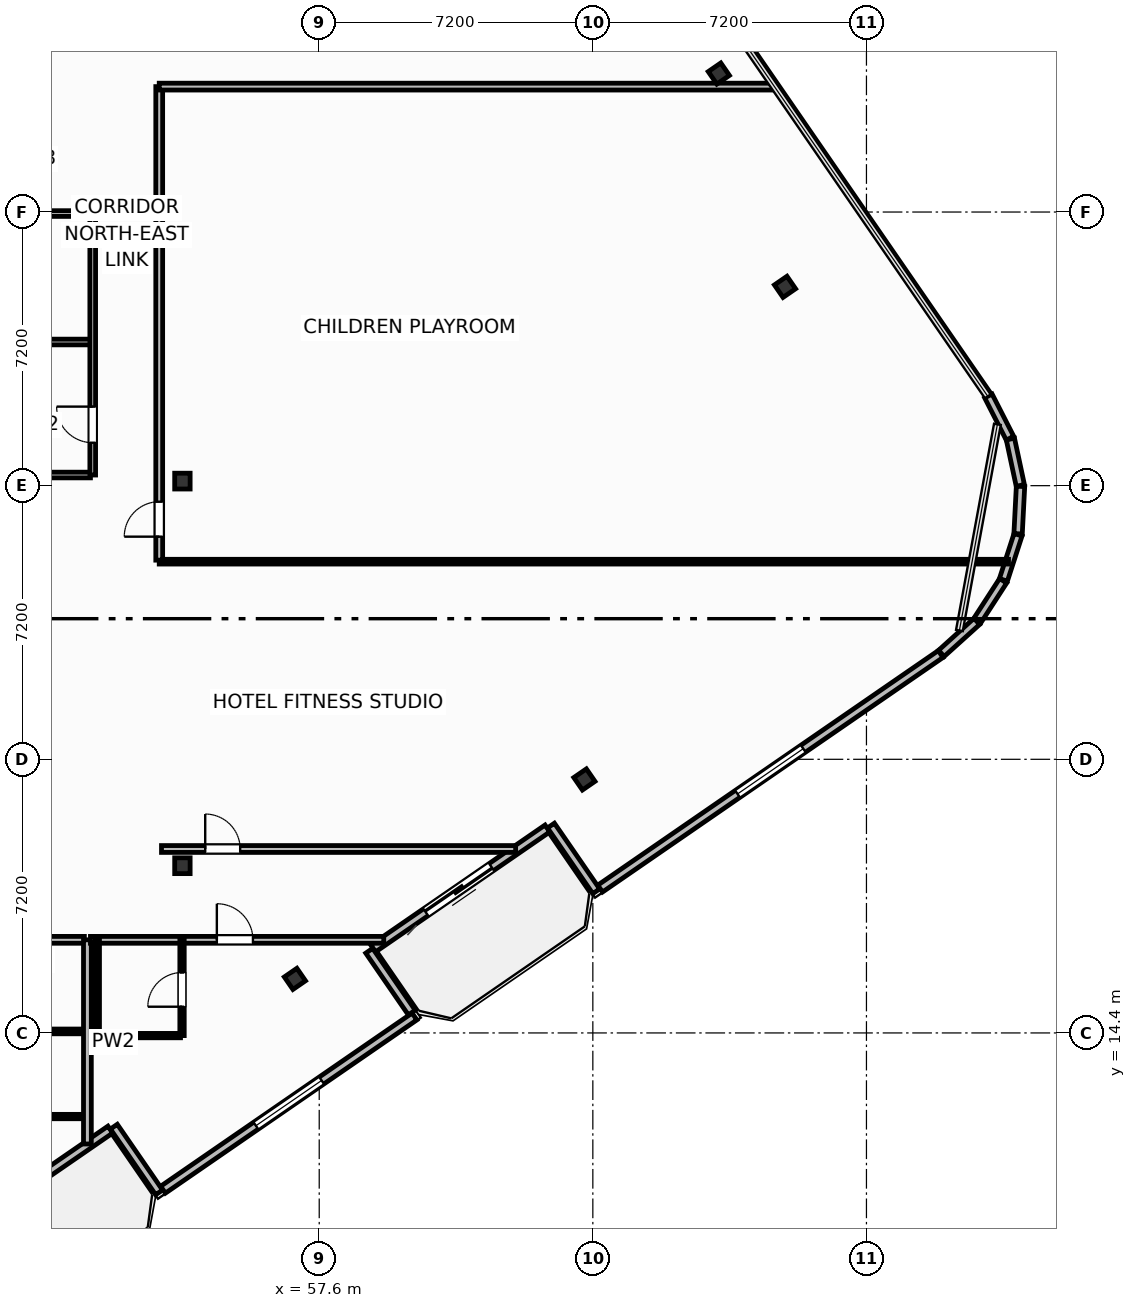
"""IFC4 building model, lengths in metres.
Left out: names, types, materials, properties, quantities, classifications, styles, units other than length and angle.
Written with IfcOpenShell. Run it as: python <this file> out.ifc"""

import sys

from ifc_helpers import new_model, si_unit, direction, frame, frame_2d, origin, origin_2d, place, context, subcontext, project, spatial, rectangle, i_section, extrude, element, fill, save


model = new_model("IFC4")
c1 = context("Model", 3, precision=1e-05, world=origin(), true_north=direction((0.0, 1.0)))
c2 = subcontext(c1, "Body", "Model", "MODEL_VIEW")
j1 = project(units=[si_unit("LENGTHUNIT", "METRE"), si_unit("PLANEANGLEUNIT", "RADIAN")], contexts=[c1])
p1 = place(None, origin())
s1 = spatial("IfcSite", under=j1, at=p1, CompositionType="ELEMENT")
p2 = place(p1, origin())
s2 = spatial("IfcBuilding", under=s1, at=p2, CompositionType="ELEMENT")
p3 = place(p2, frame((0.0, 0.0, 273.0)))
s3 = spatial("IfcBuildingStorey", under=s2, at=p3, CompositionType="ELEMENT", Elevation=273.0)
for number, where, z_axis, x_axis in (
    (1, (54.0, 18.8, 0.0), (0.0, 0.0, 1.0), (1.0, 0.0, 0.0)),
    (2, (54.0, 28.92, 0.0), (0.0, 0.0, 1.0), (1.0, 0.0, 0.0)),
):
    element("IfcColumn", number, at=place(p3, frame(where, z_axis=z_axis, x_axis=x_axis)), inside=s3, PredefinedType="COLUMN", context=c2, shape_type="SweptSolid", body=[
        extrude(i_section(OverallWidth=0.406, OverallDepth=0.416, WebThickness=0.03, FlangeThickness=0.048, FilletRadius=0.025, at=origin_2d()), origin(), (0.0, 0.0, 1.0), 3.7),
    ])
for number, where, z_axis, x_axis in (
    (3, (56.96, 15.823, 0.0), (0.0, 0.0, 1.0), (0.824, 0.567, 0.0)),
    (4, (64.578, 21.07, 0.0), (0.0, 0.0, 1.0), (0.824, 0.567, 0.0)),
    (5, (69.857, 34.031, 0.0), (0.0, 0.0, 1.0), (0.824, 0.567, 0.0)),
    (6, (68.115, 39.644, 0.0), (0.0, 0.0, 1.0), (0.824, 0.567, 0.0)),
):
    element("IfcColumn", number, at=place(p3, frame(where, z_axis=z_axis, x_axis=x_axis)), inside=s3, PredefinedType="COLUMN", context=c2, shape_type="SweptSolid", body=[
        extrude(i_section(OverallWidth=0.401, OverallDepth=0.399, WebThickness=0.025, FlangeThickness=0.04, FilletRadius=0.022, at=origin_2d()), origin(), (0.0, 0.0, 1.0), 3.7),
    ])
p4 = place(p3, frame((52.103, 11.857, 0.0), z_axis=(0.0, 0.0, 1.0), x_axis=(-0.823534636215, -0.567265989598, 0.0)))
e7 = element("IfcWall", 7, at=p4, inside=s3, PredefinedType="SOLIDWALL", context=c2, shape_type="SweptSolid", body=[
    extrude(rectangle(XDim=6.0, YDim=0.22, at=frame_2d((3.0, 0.0))), origin(), (0.0, 0.0, 1.0), 2.73),
])
p5 = place(p4, frame((3.5, 0.0, 0.0)))
e8 = element("IfcOpeningElement", 8, at=p5, cuts=e7, PredefinedType="OPENING", context=c2, shape_type="SweptSolid", body=[
    extrude(rectangle(XDim=2.1, YDim=2.3, at=frame_2d((1.05, 1.15))), frame((0.0, 0.12, 0.0), z_axis=(0.0, -1.0, 0.0), x_axis=(1.0, 0.0, 0.0)), (0.0, 0.0, 1.0), 0.24),
])
p6 = place(p3, frame((63.605, 19.78, 0.0), z_axis=(0.0, 0.0, 1.0), x_axis=(-0.823541290762, -0.567256328665, 0.0)))
e9 = element("IfcWall", 9, at=p6, inside=s3, PredefinedType="SOLIDWALL", context=c2, shape_type="SweptSolid", body=[
    extrude(rectangle(XDim=5.567, YDim=0.22, at=frame_2d((2.784, 0.0))), origin(), (0.0, 0.0, 1.0), 2.73),
])
p7 = place(p6, frame((1.787, 0.0, 0.0)))
e10 = element("IfcOpeningElement", 10, at=p7, cuts=e9, PredefinedType="OPENING", context=c2, shape_type="SweptSolid", body=[
    extrude(rectangle(XDim=2.1, YDim=2.3, at=frame_2d((1.05, 1.15))), frame((0.0, 0.12, 0.0), z_axis=(0.0, -1.0, 0.0), x_axis=(1.0, 0.0, 0.0)), (0.0, 0.0, 1.0), 0.24),
])
p8 = place(p3, frame((52.196, 11.933, 0.0), z_axis=(0.0, 0.0, 1.0), x_axis=(0.56729822855, -0.823512428494, 0.0)))
e11 = element("IfcWall", 11, at=p8, inside=s3, PredefinedType="SOLIDWALL", context=c2, shape_type="SweptSolid", body=[
    extrude(rectangle(XDim=2.1, YDim=0.22, at=frame_2d((1.05, 0.0))), origin(), (0.0, 0.0, 1.0), 2.73),
])
p9 = place(p3, frame((53.49, 10.275, 0.0), z_axis=(0.0, 0.0, 1.0), x_axis=(0.823530942962, 0.56727135128, 0.0)))
e12 = element("IfcWall", 12, at=p9, inside=s3, PredefinedType="SOLIDWALL", context=c2, shape_type="SweptSolid", body=[
    extrude(rectangle(XDim=8.035, YDim=0.22, at=frame_2d((4.018, 0.0))), origin(), (0.0, 0.0, 1.0), 2.73),
])
p10 = place(p9, frame((2.968, 0.0, 0.8)))
e13 = element("IfcOpeningElement", 13, at=p10, cuts=e12, PredefinedType="OPENING", context=c2, shape_type="SweptSolid", body=[
    extrude(rectangle(XDim=2.1, YDim=1.75, at=frame_2d((1.05, 0.875))), frame((0.0, 0.12, 0.0), z_axis=(0.0, -1.0, 0.0), x_axis=(1.0, 0.0, 0.0)), (0.0, 0.0, 1.0), 0.24),
])
p11 = place(p3, frame((60.036, 14.936, 0.0), z_axis=(0.0, 0.0, 1.0), x_axis=(-0.567273565974, 0.823529417415, 0.0)))
e14 = element("IfcWall", 14, at=p11, inside=s3, PredefinedType="SOLIDWALL", context=c2, shape_type="SweptSolid", body=[
    extrude(rectangle(XDim=1.975, YDim=0.22, at=frame_2d((0.988, 0.0))), origin(), (0.0, 0.0, 1.0), 2.73),
])
p12 = place(p3, frame((63.698, 19.856, 0.0), z_axis=(0.0, 0.0, 1.0), x_axis=(0.567219383419, -0.823566737474, 0.0)))
e15 = element("IfcWall", 15, at=p12, inside=s3, PredefinedType="SOLIDWALL", context=c2, shape_type="SweptSolid", body=[
    extrude(rectangle(XDim=2.1, YDim=0.22, at=frame_2d((1.05, 0.0))), origin(), (0.0, 0.0, 1.0), 2.73),
])
p13 = place(p3, frame((64.992, 18.198, 0.0), z_axis=(0.0, 0.0, 1.0), x_axis=(0.823538117322, 0.56726093583, 0.0)))
e16 = element("IfcWall", 16, at=p13, inside=s3, PredefinedType="SOLIDWALL", context=c2, shape_type="SweptSolid", body=[
    extrude(rectangle(XDim=10.88, YDim=0.22, at=frame_2d((5.44, 0.0))), origin(), (0.0, 0.0, 1.0), 2.73),
])
p14 = place(p13, frame((4.39, 0.0, 0.8)))
e17 = element("IfcOpeningElement", 17, at=p14, cuts=e16, PredefinedType="OPENING", context=c2, shape_type="SweptSolid", body=[
    extrude(rectangle(XDim=2.1, YDim=1.75, at=frame_2d((1.05, 0.875))), frame((0.0, 0.12, 0.0), z_axis=(0.0, -1.0, 0.0), x_axis=(1.0, 0.0, 0.0)), (0.0, 0.0, 1.0), 0.24),
])
p15 = place(p3, frame((73.971, 24.387, 0.0), z_axis=(0.0, 0.0, 1.0), x_axis=(0.742501517089, 0.669844382764, 0.0)))
e18 = element("IfcWall", 18, at=p15, inside=s3, PredefinedType="SOLIDWALL", context=c2, shape_type="SweptSolid", body=[
    extrude(rectangle(XDim=1.257, YDim=0.22, at=frame_2d((0.628, 0.0))), origin(), (0.0, 0.0, 1.0), 2.73),
])
p16 = place(p3, frame((74.917, 25.25, 0.0), z_axis=(0.0, 0.0, 1.0), x_axis=(0.543778157277, 0.839229000731, 0.0)))
e19 = element("IfcWall", 19, at=p16, inside=s3, PredefinedType="SOLIDWALL", context=c2, shape_type="SweptSolid", body=[
    extrude(rectangle(XDim=1.249, YDim=0.22, at=frame_2d((0.624, 0.0))), origin(), (0.0, 0.0, 1.0), 2.73),
])
for number, where, z_axis, x_axis in (
    (20, (75.604, 26.321, 0.0), (0.0, 0.0, 1.0), (0.308, 0.951, 0.0)),
    (21, (75.99, 27.534, 0.0), (0.0, 0.0, 1.0), (0.051, 0.999, 0.0)),
    (22, (76.049, 28.805, 0.0), (0.0, 0.0, 1.0), (-0.209, 0.978, 0.0)),
    (23, (75.777, 30.049, 0.0), (0.0, 0.0, 1.0), (-0.455, 0.891, 0.0)),
):
    element("IfcWall", number, at=place(p3, frame(where, z_axis=z_axis, x_axis=x_axis)), inside=s3, PredefinedType="SOLIDWALL", context=c2, shape_type="SweptSolid", body=[
        extrude(rectangle(XDim=1.249, YDim=0.22, at=frame_2d((0.625, 0.0))), origin(), (0.0, 0.0, 1.0), 2.73),
    ])
p17 = place(p3, frame((39.28, 16.85, 0.0), z_axis=(0.0, 0.0, 1.0), x_axis=(1.0, 0.0, 0.0)))
e24 = element("IfcWall", 24, at=p17, inside=s3, PredefinedType="PARTITIONING", context=c2, shape_type="SweptSolid", body=[
    extrude(rectangle(XDim=12.14, YDim=0.18, at=frame_2d((6.07, 0.0))), origin(), (0.0, 0.0, 1.0), 3.45),
])
p18 = place(p17, frame((3.135, 0.0, 0.0)))
e25 = element("IfcOpeningElement", 25, at=p18, cuts=e24, PredefinedType="OPENING", context=c2, shape_type="SweptSolid", body=[
    extrude(rectangle(XDim=1.0, YDim=2.2, at=frame_2d((0.5, 1.1))), frame((0.0, 0.1, 0.0), z_axis=(0.0, -1.0, 0.0), x_axis=(1.0, 0.0, 0.0)), (0.0, 0.0, 1.0), 0.2),
])
p19 = place(p3, frame((46.69, 14.44, 0.0), z_axis=(0.0, 0.0, 1.0), x_axis=(1.0, 0.0, 0.0)))
e26 = element("IfcWall", 26, at=p19, inside=s3, PredefinedType="PARTITIONING", context=c2, shape_type="SweptSolid", body=[
    extrude(rectangle(XDim=4.73, YDim=0.125, at=frame_2d((2.365, 0.0))), origin(), (0.0, 0.0, 1.0), 3.45),
])
p20 = place(p3, frame((46.69, 12.2, 0.0), z_axis=(0.0, 0.0, 1.0), x_axis=(1.0, 0.0, 0.0)))
e27 = element("IfcWall", 27, at=p20, inside=s3, PredefinedType="PARTITIONING", context=c2, shape_type="SweptSolid", body=[
    extrude(rectangle(XDim=4.73, YDim=0.115, at=frame_2d((2.365, 0.0))), origin(), (0.0, 0.0, 1.0), 3.45),
])
p21 = place(p3, frame((51.5, 11.479, 0.0), z_axis=(0.0, 0.0, 1.0), x_axis=(0.0, 1.0, 0.0)))
e28 = element("IfcWall", 28, at=p21, inside=s3, PredefinedType="PARTITIONING", context=c2, shape_type="SweptSolid", body=[
    extrude(rectangle(XDim=5.372, YDim=0.205, at=frame_2d((2.686, 0.0))), origin(), (0.0, 0.0, 1.0), 3.45),
])
p22 = place(p3, frame((51.58, 16.85, 0.0), z_axis=(0.0, 0.0, 1.0), x_axis=(1.0, 0.0, 0.0)))
e29 = element("IfcWall", 29, at=p22, inside=s3, PredefinedType="PARTITIONING", context=c2, shape_type="SweptSolid", body=[
    extrude(rectangle(XDim=7.718, YDim=0.18, at=frame_2d((3.859, 0.0))), origin(), (0.0, 0.0, 1.0), 3.45),
])
p23 = place(p22, frame((3.326, 0.0, 0.0)))
e30 = element("IfcOpeningElement", 30, at=p23, cuts=e29, PredefinedType="OPENING", context=c2, shape_type="SweptSolid", body=[
    extrude(rectangle(XDim=0.95, YDim=2.15, at=frame_2d((0.475, 1.075))), frame((0.0, 0.1, 0.0), z_axis=(0.0, -1.0, 0.0), x_axis=(1.0, 0.0, 0.0)), (0.0, 0.0, 1.0), 0.2),
])
p24 = place(p3, frame((51.8, 14.33, 0.0), z_axis=(0.0, 0.0, 1.0), x_axis=(1.0, 0.0, 0.0)))
e31 = element("IfcWall", 31, at=p24, inside=s3, PredefinedType="PARTITIONING", context=c2, shape_type="SweptSolid", body=[
    extrude(rectangle(XDim=2.15, YDim=0.115, at=frame_2d((1.075, 0.0))), origin(), (0.0, 0.0, 1.0), 3.45),
])
p25 = place(p3, frame((53.99, 14.33, 0.0), z_axis=(0.0, 0.0, 1.0), x_axis=(0.0, 1.0, 0.0)))
e32 = element("IfcWall", 32, at=p25, inside=s3, PredefinedType="PARTITIONING", context=c2, shape_type="SweptSolid", body=[
    extrude(rectangle(XDim=2.52, YDim=0.115, at=frame_2d((1.26, 0.0))), origin(), (0.0, 0.0, 1.0), 3.45),
])
p26 = place(p25, frame((0.76, 0.0, 0.0)))
e33 = element("IfcOpeningElement", 33, at=p26, cuts=e32, PredefinedType="OPENING", context=c2, shape_type="SweptSolid", body=[
    extrude(rectangle(XDim=0.9, YDim=2.05, at=frame_2d((0.45, 1.025))), frame((0.0, 0.067, 0.0), z_axis=(0.0, -1.0, 0.0), x_axis=(1.0, 0.0, 0.0)), (0.0, 0.0, 1.0), 0.135),
])
p27 = place(p3, frame((51.76, 14.33, 0.0), z_axis=(0.0, 0.0, 1.0), x_axis=(0.0, 1.0, 0.0)))
e34 = element("IfcWall", 34, at=p27, inside=s3, PredefinedType="PARTITIONING", context=c2, shape_type="SweptSolid", body=[
    extrude(rectangle(XDim=2.52, YDim=0.115, at=frame_2d((1.26, 0.0))), origin(), (0.0, 0.0, 1.0), 3.45),
])
p28 = place(p3, frame((53.45, 19.24, 0.0), z_axis=(0.0, 0.0, 1.0), x_axis=(1.0, 0.0, 0.0)))
e35 = element("IfcWall", 35, at=p28, inside=s3, PredefinedType="PARTITIONING", context=c2, shape_type="SweptSolid", body=[
    extrude(rectangle(XDim=9.318, YDim=0.18, at=frame_2d((4.659, 0.0))), origin(), (0.0, 0.0, 1.0), 2.739),
])
p29 = place(p28, frame((1.15, 0.0, 0.0)))
e36 = element("IfcOpeningElement", 36, at=p29, cuts=e35, PredefinedType="OPENING", context=c2, shape_type="SweptSolid", body=[
    extrude(rectangle(XDim=0.92, YDim=2.05, at=frame_2d((0.46, 1.025))), frame((0.0, 0.1, 0.0), z_axis=(0.0, -1.0, 0.0), x_axis=(1.0, 0.0, 0.0)), (0.0, 0.0, 1.0), 0.2),
])
p30 = place(p3, frame((53.39, 26.8, 0.0), z_axis=(0.0, 0.0, 1.0), x_axis=(1.0, 0.0, 0.0)))
e37 = element("IfcWall", 37, at=p30, inside=s3, PredefinedType="PARTITIONING", context=c2, shape_type="SweptSolid", body=[
    extrude(rectangle(XDim=22.348, YDim=0.125, at=frame_2d((11.174, 0.0))), origin(), (0.0, 0.0, 1.0), 3.45),
])
p31 = place(p3, frame((53.39, 26.84, 0.0), z_axis=(0.0, 0.0, 1.0), x_axis=(0.0, 1.0, 0.0)))
e38 = element("IfcWall", 38, at=p31, inside=s3, PredefinedType="PARTITIONING", context=c2, shape_type="SweptSolid", body=[
    extrude(rectangle(XDim=12.46, YDim=0.18, at=frame_2d((6.23, 0.0))), origin(), (0.0, 0.0, 1.0), 3.45),
])
p32 = place(p31, frame((0.618, 0.0, 0.0)))
e39 = element("IfcOpeningElement", 39, at=p32, cuts=e38, PredefinedType="OPENING", context=c2, shape_type="SweptSolid", body=[
    extrude(rectangle(XDim=0.92, YDim=2.05, at=frame_2d((0.46, 1.025))), frame((0.0, 0.1, 0.0), z_axis=(0.0, -1.0, 0.0), x_axis=(1.0, 0.0, 0.0)), (0.0, 0.0, 1.0), 0.2),
])
p33 = place(p3, frame((53.39, 39.3, 0.0), z_axis=(0.0, 0.0, 1.0), x_axis=(1.0, 0.0, 0.0)))
e40 = element("IfcWall", 40, at=p33, inside=s3, PredefinedType="PARTITIONING", context=c2, shape_type="SweptSolid", body=[
    extrude(rectangle(XDim=16.149, YDim=0.18, at=frame_2d((8.075, 0.0))), origin(), (0.0, 0.0, 1.0), 2.739),
])
p34 = place(p3, frame((48.3, 32.58, 0.0), z_axis=(0.0, 0.0, 1.0), x_axis=(1.0, 0.0, 0.0)))
e41 = element("IfcWall", 41, at=p34, inside=s3, PredefinedType="PARTITIONING", context=c2, shape_type="SweptSolid", body=[
    extrude(rectangle(XDim=3.28, YDim=0.15, at=frame_2d((1.64, 0.0))), origin(), (0.0, 0.0, 1.0), 3.45),
])
p35 = place(p34, frame((1.15, 0.0, 0.0)))
e42 = element("IfcOpeningElement", 42, at=p35, cuts=e41, PredefinedType="OPENING", context=c2, shape_type="SweptSolid", body=[
    extrude(rectangle(XDim=0.95, YDim=2.05, at=frame_2d((0.475, 1.025))), frame((0.0, 0.085, 0.0), z_axis=(0.0, -1.0, 0.0), x_axis=(1.0, 0.0, 0.0)), (0.0, 0.0, 1.0), 0.17),
])
p36 = place(p3, frame((48.3, 29.08, 0.0), z_axis=(0.0, 0.0, 1.0), x_axis=(1.0, 0.0, 0.0)))
e43 = element("IfcWall", 43, at=p36, inside=s3, PredefinedType="PARTITIONING", context=c2, shape_type="SweptSolid", body=[
    extrude(rectangle(XDim=3.28, YDim=0.15, at=frame_2d((1.64, 0.0))), origin(), (0.0, 0.0, 1.0), 2.662),
])
p37 = place(p3, frame((48.3, 35.96, 0.0), z_axis=(0.0, 0.0, 1.0), x_axis=(1.0, 0.0, 0.0)))
e44 = element("IfcWall", 44, at=p37, inside=s3, PredefinedType="PARTITIONING", context=c2, shape_type="SweptSolid", body=[
    extrude(rectangle(XDim=3.28, YDim=0.15, at=frame_2d((1.64, 0.0))), origin(), (0.0, 0.0, 1.0), 3.45),
])
p38 = place(p3, frame((51.64, 29.08, 0.0), z_axis=(0.0, 0.0, 1.0), x_axis=(0.0, 1.0, 0.0)))
e45 = element("IfcWall", 45, at=p38, inside=s3, PredefinedType="PARTITIONING", context=c2, shape_type="SweptSolid", body=[
    extrude(rectangle(XDim=6.88, YDim=0.15, at=frame_2d((3.44, 0.0))), origin(), (0.0, 0.0, 1.0), 3.45),
])
p39 = place(p38, frame((0.85, 0.0, 0.0)))
e46 = element("IfcOpeningElement", 46, at=p39, cuts=e45, PredefinedType="OPENING", context=c2, shape_type="SweptSolid", body=[
    extrude(rectangle(XDim=0.95, YDim=2.05, at=frame_2d((0.475, 1.025))), frame((0.0, 0.085, 0.0), z_axis=(0.0, -1.0, 0.0), x_axis=(1.0, 0.0, 0.0)), (0.0, 0.0, 1.0), 0.17),
])
p40 = place(p7, origin())
e47 = element("IfcDoor", 47, at=p40, inside=s3, OperationType="SLIDING_TO_LEFT", PredefinedType="DOOR", context=c2, shape_type="SweptSolid", body=[
    extrude(rectangle(XDim=2.1, YDim=2.3, at=frame_2d((1.05, 1.15))), frame((0.0, 0.025, 0.0), z_axis=(0.0, -1.0, 0.0), x_axis=(1.0, 0.0, 0.0)), (0.0, 0.0, 1.0), 0.05),
])
fill(e10, e47)
p41 = place(p10, origin())
e48 = element("IfcWindow", 48, at=p41, inside=s3, PartitioningType="SINGLE_PANEL", PredefinedType="WINDOW", context=c2, shape_type="SweptSolid", body=[
    extrude(rectangle(XDim=2.1, YDim=1.75, at=frame_2d((1.05, 0.875))), frame((0.0, 0.03, 0.0), z_axis=(0.0, -1.0, 0.0), x_axis=(1.0, 0.0, 0.0)), (0.0, 0.0, 1.0), 0.06),
])
fill(e13, e48)
p42 = place(p14, origin())
e49 = element("IfcWindow", 49, at=p42, inside=s3, PartitioningType="SINGLE_PANEL", PredefinedType="WINDOW", context=c2, shape_type="SweptSolid", body=[
    extrude(rectangle(XDim=2.1, YDim=1.75, at=frame_2d((1.05, 0.875))), frame((0.0, 0.03, 0.0), z_axis=(0.0, -1.0, 0.0), x_axis=(1.0, 0.0, 0.0)), (0.0, 0.0, 1.0), 0.06),
])
fill(e17, e49)
p43 = place(p23, origin())
e50 = element("IfcDoor", 50, at=p43, inside=s3, OperationType="SINGLE_SWING_LEFT", PredefinedType="DOOR", context=c2, shape_type="SweptSolid", body=[
    extrude(rectangle(XDim=0.95, YDim=2.15, at=frame_2d((0.475, 1.075))), frame((0.0, 0.025, 0.0), z_axis=(0.0, -1.0, 0.0), x_axis=(1.0, 0.0, 0.0)), (0.0, 0.0, 1.0), 0.05),
])
fill(e30, e50)
p44 = place(p26, origin())
e51 = element("IfcDoor", 51, at=p44, inside=s3, OperationType="SINGLE_SWING_LEFT", PredefinedType="DOOR", context=c2, shape_type="SweptSolid", body=[
    extrude(rectangle(XDim=0.9, YDim=2.05, at=frame_2d((0.45, 1.025))), frame((0.0, 0.025, 0.0), z_axis=(0.0, -1.0, 0.0), x_axis=(1.0, 0.0, 0.0)), (0.0, 0.0, 1.0), 0.05),
])
fill(e33, e51)
p45 = place(p29, origin())
e52 = element("IfcDoor", 52, at=p45, inside=s3, OperationType="SINGLE_SWING_LEFT", PredefinedType="DOOR", context=c2, shape_type="SweptSolid", body=[
    extrude(rectangle(XDim=0.92, YDim=2.05, at=frame_2d((0.46, 1.025))), frame((0.0, 0.025, 0.0), z_axis=(0.0, -1.0, 0.0), x_axis=(1.0, 0.0, 0.0)), (0.0, 0.0, 1.0), 0.05),
])
fill(e36, e52)
p46 = place(p32, origin())
e53 = element("IfcDoor", 53, at=p46, inside=s3, OperationType="SINGLE_SWING_LEFT", PredefinedType="DOOR", context=c2, shape_type="SweptSolid", body=[
    extrude(rectangle(XDim=0.92, YDim=2.05, at=frame_2d((0.46, 1.025))), frame((0.0, 0.025, 0.0), z_axis=(0.0, -1.0, 0.0), x_axis=(1.0, 0.0, 0.0)), (0.0, 0.0, 1.0), 0.05),
])
fill(e39, e53)
p47 = place(p39, origin())
e54 = element("IfcDoor", 54, at=p47, inside=s3, OperationType="SINGLE_SWING_RIGHT", PredefinedType="DOOR", context=c2, shape_type="SweptSolid", body=[
    extrude(rectangle(XDim=0.95, YDim=2.05, at=frame_2d((0.475, 1.025))), frame((0.0, 0.025, 0.0), z_axis=(0.0, -1.0, 0.0), x_axis=(1.0, 0.0, 0.0)), (0.0, 0.0, 1.0), 0.05),
])
fill(e46, e54)
save(model, sys.argv[1])
